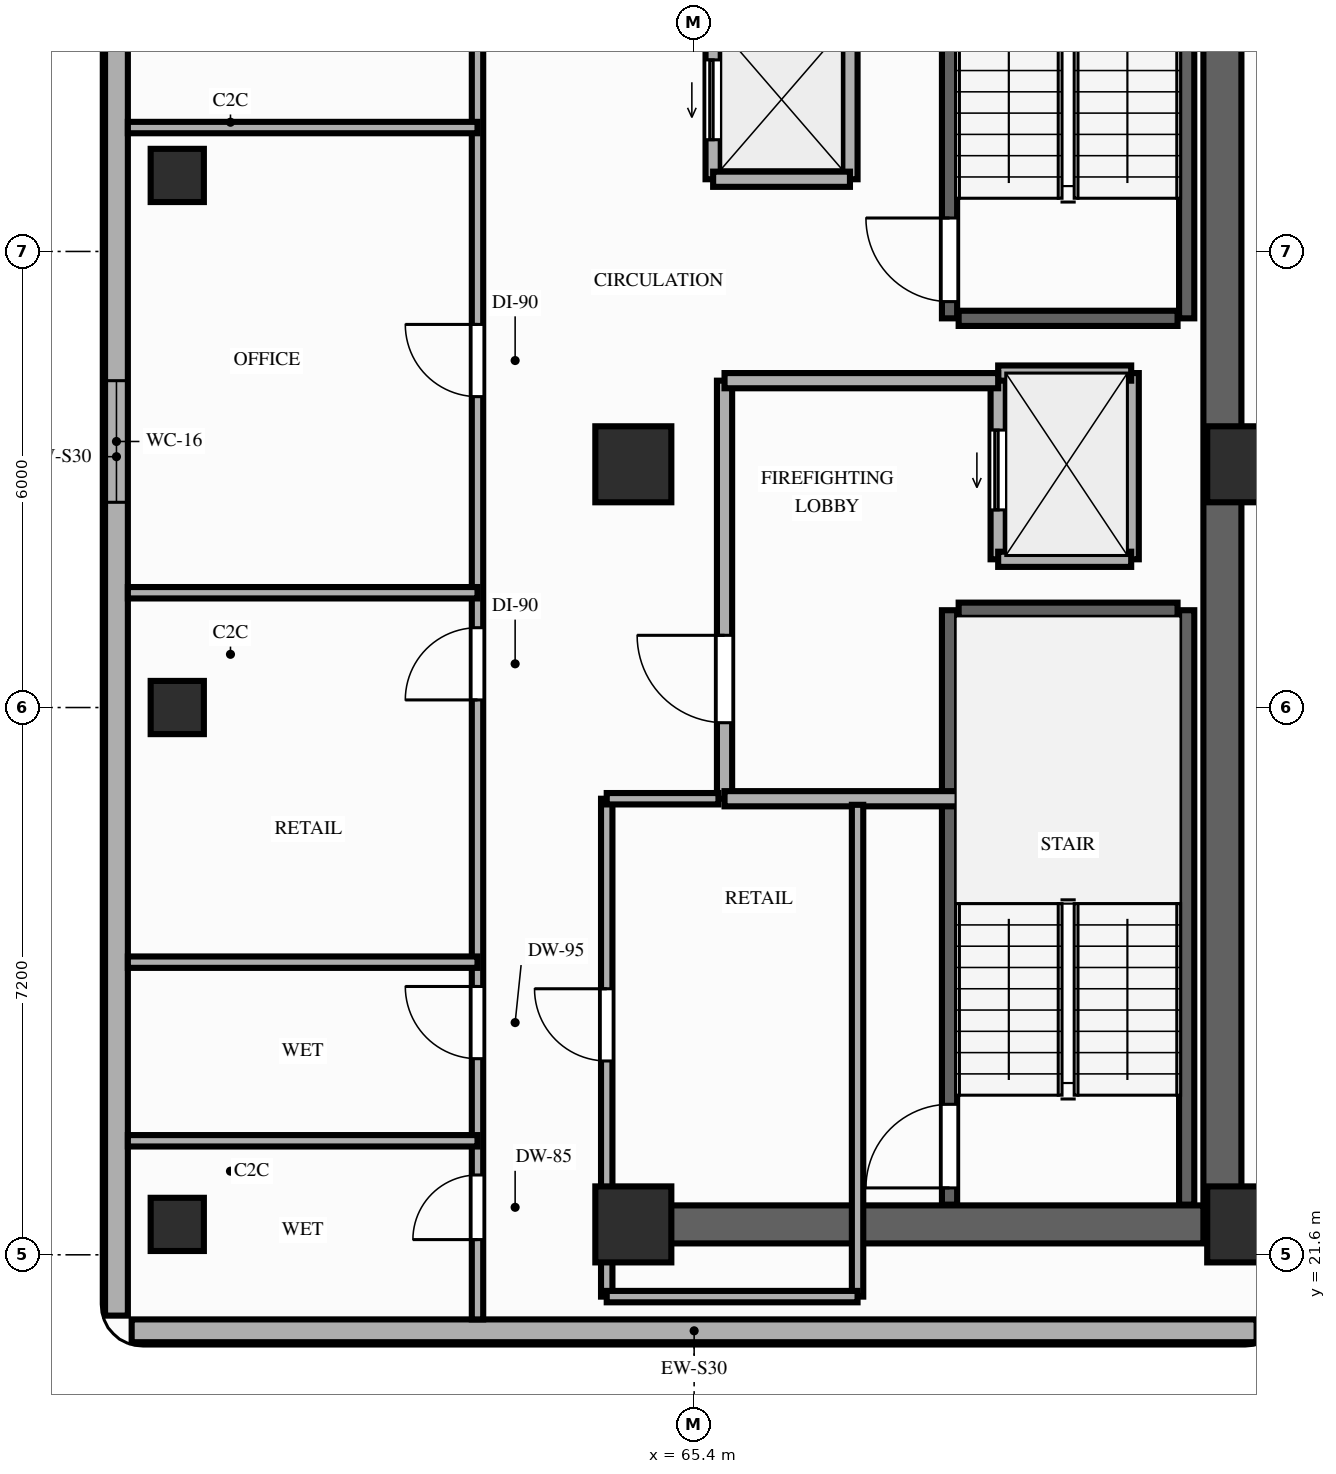
"""IFC4 building model, lengths in metres.
Left out: names, types, materials, properties, quantities, classifications, styles, units other than length and angle.
Written with IfcOpenShell. Run it as: python <this file> out.ifc"""

import sys

from ifc_helpers import new_model, si_unit, direction, frame, frame_2d, origin, origin_2d, place, context, subcontext, project, spatial, rectangle, extrude, element, fill, save


model = new_model("IFC4")
c1 = context("Model", 3, precision=1e-05, world=origin(), true_north=direction((0.0, 1.0)))
c2 = subcontext(c1, "Body", "Model", "MODEL_VIEW")
j1 = project(units=[si_unit("LENGTHUNIT", "METRE"), si_unit("PLANEANGLEUNIT", "RADIAN")], contexts=[c1])
p1 = place(None, origin())
s1 = spatial("IfcSite", under=j1, at=p1, CompositionType="ELEMENT")
p2 = place(p1, origin())
s2 = spatial("IfcBuilding", under=s1, at=p2, CompositionType="ELEMENT")
p3 = place(p2, frame((0.0, 0.0, 96.2)))
s3 = spatial("IfcBuildingStorey", under=s2, at=p3, CompositionType="ELEMENT", Elevation=96.2)
for number, where, z_axis, x_axis in (
    (1, (64.6, 22.0, 0.0), (0.0, 0.0, 1.0), (1.0, 0.0, 0.0)),
    (2, (72.65, 22.0, 0.0), (0.0, 0.0, 1.0), (1.0, 0.0, 0.0)),
    (3, (64.6, 32.0, 0.0), (0.0, 0.0, 1.0), (1.0, 0.0, 0.0)),
    (4, (72.65, 32.0, 0.0), (0.0, 0.0, 1.0), (1.0, 0.0, 0.0)),
):
    element("IfcColumn", number, at=place(p3, frame(where, z_axis=z_axis, x_axis=x_axis)), inside=s3, PredefinedType="COLUMN", context=c2, shape_type="SweptSolid", body=[
        extrude(rectangle(XDim=1.0, YDim=1.0, at=origin_2d()), origin(), (0.0, 0.0, 1.0), 3.2),
    ])
for number, where, z_axis, x_axis in (
    (5, (58.6, 22.0, 0.0), (0.0, 0.0, 1.0), (1.0, 0.0, 0.0)),
    (6, (58.6, 28.8, 0.0), (0.0, 0.0, 1.0), (1.0, 0.0, 0.0)),
    (7, (58.6, 35.8, 0.0), (0.0, 0.0, 1.0), (1.0, 0.0, 0.0)),
):
    element("IfcColumn", number, at=place(p3, frame(where, z_axis=z_axis, x_axis=x_axis)), inside=s3, PredefinedType="COLUMN", context=c2, shape_type="SweptSolid", body=[
        extrude(rectangle(XDim=0.7, YDim=0.7, at=origin_2d()), origin(), (0.0, 0.0, 1.0), 3.2),
    ])
p4 = place(p3, frame((57.8, 43.4, 0.0), z_axis=(0.0, 0.0, 1.0), x_axis=(0.0, -1.0, 0.0)))
e8 = element("IfcWall", 8, at=p4, inside=s3, PredefinedType="STANDARD", context=c2, shape_type="SweptSolid", body=[
    extrude(rectangle(XDim=22.6, YDim=0.3, at=frame_2d((11.3, 0.0))), origin(), (0.0, 0.0, 1.0), 2.72),
])
p5 = place(p4, frame((3.7, 0.0, 0.0)))
e9 = element("IfcOpeningElement", 9, at=p5, cuts=e8, PredefinedType="OPENING", context=c2, shape_type="SweptSolid", body=[
    extrude(rectangle(XDim=1.4, YDim=2.1, at=frame_2d((0.7, 1.05))), frame((0.0, 0.16, 0.0), z_axis=(0.0, -1.0, 0.0), x_axis=(1.0, 0.0, 0.0)), (0.0, 0.0, 1.0), 0.32),
])
p6 = place(p4, frame((10.3, 0.0, 0.85)))
e10 = element("IfcOpeningElement", 10, at=p6, cuts=e8, PredefinedType="OPENING", context=c2, shape_type="SweptSolid", body=[
    extrude(rectangle(XDim=1.6, YDim=1.57, at=frame_2d((0.8, 0.785))), frame((0.0, 0.16, 0.0), z_axis=(0.0, -1.0, 0.0), x_axis=(1.0, 0.0, 0.0)), (0.0, 0.0, 1.0), 0.32),
])
p7 = place(p3, frame((58.0, 20.6, 0.0), z_axis=(0.0, 0.0, 1.0), x_axis=(1.0, 0.0, 0.0)))
e11 = element("IfcWall", 11, at=p7, inside=s3, PredefinedType="STANDARD", context=c2, shape_type="SweptSolid", body=[
    extrude(rectangle(XDim=14.8, YDim=0.3, at=frame_2d((7.4, 0.0))), origin(), (0.0, 0.0, 1.0), 3.02),
])
p8 = place(p3, frame((72.35, 22.0, 0.0), z_axis=(0.0, 0.0, 1.0), x_axis=(0.0, 1.0, 0.0)))
e12 = element("IfcWall", 12, at=p8, inside=s3, PredefinedType="SHEAR", context=c2, shape_type="SweptSolid", body=[
    extrude(rectangle(XDim=20.25, YDim=0.5, at=frame_2d((10.125, 0.0))), origin(), (0.0, 0.0, 1.0), 3.02),
])
p9 = place(p3, frame((64.6, 22.0, 0.0), z_axis=(0.0, 0.0, 1.0), x_axis=(1.0, 0.0, 0.0)))
e13 = element("IfcWall", 13, at=p9, inside=s3, PredefinedType="SHEAR", context=c2, shape_type="SweptSolid", body=[
    extrude(rectangle(XDim=7.5, YDim=0.5, at=frame_2d((3.75, 0.0))), origin(), (0.0, 0.0, 1.0), 3.02),
])
p10 = place(p3, frame((68.76, 22.26, 0.0), z_axis=(0.0, 0.0, 1.0), x_axis=(0.0, 1.0, 0.0)))
e14 = element("IfcWall", 14, at=p10, inside=s3, PredefinedType="SHEAR", context=c2, shape_type="SweptSolid", body=[
    extrude(rectangle(XDim=7.82, YDim=0.2, at=frame_2d((3.91, 0.0))), origin(), (0.0, 0.0, 1.0), 3.02),
])
p11 = place(p10, frame((0.22, 0.0, 0.0)))
e15 = element("IfcOpeningElement", 15, at=p11, cuts=e14, PredefinedType="OPENING", context=c2, shape_type="SweptSolid", body=[
    extrude(rectangle(XDim=1.1, YDim=2.15, at=frame_2d((0.55, 1.075))), frame((0.0, 0.11, 0.0), z_axis=(0.0, -1.0, 0.0), x_axis=(1.0, 0.0, 0.0)), (0.0, 0.0, 1.0), 0.22),
])
p12 = place(p3, frame((71.88, 22.26, 0.0), z_axis=(0.0, 0.0, 1.0), x_axis=(0.0, 1.0, 0.0)))
e16 = element("IfcWall", 16, at=p12, inside=s3, PredefinedType="SHEAR", context=c2, shape_type="SweptSolid", body=[
    extrude(rectangle(XDim=7.82, YDim=0.2, at=frame_2d((3.91, 0.0))), origin(), (0.0, 0.0, 1.0), 3.02),
])
p13 = place(p3, frame((68.88, 30.08, 0.0), z_axis=(0.0, 0.0, 1.0), x_axis=(1.0, 0.0, 0.0)))
e17 = element("IfcWall", 17, at=p13, inside=s3, PredefinedType="SHEAR", context=c2, shape_type="SweptSolid", body=[
    extrude(rectangle(XDim=2.88, YDim=0.2, at=frame_2d((1.44, 0.0))), origin(), (0.0, 0.0, 1.0), 3.02),
])
p14 = place(p3, frame((68.76, 33.92, 0.0), z_axis=(0.0, 0.0, 1.0), x_axis=(0.0, 1.0, 0.0)))
e18 = element("IfcWall", 18, at=p14, inside=s3, PredefinedType="SHEAR", context=c2, shape_type="SweptSolid", body=[
    extrude(rectangle(XDim=7.96, YDim=0.2, at=frame_2d((3.98, 0.0))), origin(), (0.0, 0.0, 1.0), 3.02),
])
p15 = place(p14, frame((0.22, 0.0, 0.0)))
e19 = element("IfcOpeningElement", 19, at=p15, cuts=e18, PredefinedType="OPENING", context=c2, shape_type="SweptSolid", body=[
    extrude(rectangle(XDim=1.1, YDim=2.15, at=frame_2d((0.55, 1.075))), frame((0.0, 0.11, 0.0), z_axis=(0.0, -1.0, 0.0), x_axis=(1.0, 0.0, 0.0)), (0.0, 0.0, 1.0), 0.22),
])
p16 = place(p3, frame((71.88, 33.92, 0.0), z_axis=(0.0, 0.0, 1.0), x_axis=(0.0, 1.0, 0.0)))
e20 = element("IfcWall", 20, at=p16, inside=s3, PredefinedType="SHEAR", context=c2, shape_type="SweptSolid", body=[
    extrude(rectangle(XDim=7.96, YDim=0.2, at=frame_2d((3.98, 0.0))), origin(), (0.0, 0.0, 1.0), 3.02),
])
p17 = place(p3, frame((68.88, 33.92, 0.0), z_axis=(0.0, 0.0, 1.0), x_axis=(1.0, 0.0, 0.0)))
e21 = element("IfcWall", 21, at=p17, inside=s3, PredefinedType="SHEAR", context=c2, shape_type="SweptSolid", body=[
    extrude(rectangle(XDim=2.88, YDim=0.2, at=frame_2d((1.44, 0.0))), origin(), (0.0, 0.0, 1.0), 3.02),
])
p18 = place(p3, frame((65.65, 35.75, 0.0), z_axis=(0.0, 0.0, 1.0), x_axis=(0.0, 1.0, 0.0)))
e22 = element("IfcWall", 22, at=p18, inside=s3, PredefinedType="MOVABLE", context=c2, shape_type="SweptSolid", body=[
    extrude(rectangle(XDim=6.05, YDim=0.2, at=frame_2d((3.025, 0.0))), origin(), (0.0, 0.0, 1.0), 3.02),
])
p19 = place(p18, frame((0.52, 0.0, 0.0)))
e23 = element("IfcOpeningElement", 23, at=p19, cuts=e22, PredefinedType="OPENING", context=c2, shape_type="SweptSolid", body=[
    extrude(rectangle(XDim=1.05, YDim=2.15, at=frame_2d((0.525, 1.075))), frame((0.0, 0.11, 0.0), z_axis=(0.0, -1.0, 0.0), x_axis=(1.0, 0.0, 0.0)), (0.0, 0.0, 1.0), 0.22),
])
p20 = place(p18, frame((2.48, 0.0, 0.0)))
e24 = element("IfcOpeningElement", 24, at=p20, cuts=e22, PredefinedType="OPENING", context=c2, shape_type="SweptSolid", body=[
    extrude(rectangle(XDim=1.05, YDim=2.15, at=frame_2d((0.525, 1.075))), frame((0.0, 0.11, 0.0), z_axis=(0.0, -1.0, 0.0), x_axis=(1.0, 0.0, 0.0)), (0.0, 0.0, 1.0), 0.22),
])
p21 = place(p18, frame((4.43, 0.0, 0.0)))
e25 = element("IfcOpeningElement", 25, at=p21, cuts=e22, PredefinedType="OPENING", context=c2, shape_type="SweptSolid", body=[
    extrude(rectangle(XDim=1.05, YDim=2.15, at=frame_2d((0.525, 1.075))), frame((0.0, 0.11, 0.0), z_axis=(0.0, -1.0, 0.0), x_axis=(1.0, 0.0, 0.0)), (0.0, 0.0, 1.0), 0.22),
])
p22 = place(p3, frame((67.45, 35.75, 0.0), z_axis=(0.0, 0.0, 1.0), x_axis=(0.0, 1.0, 0.0)))
e26 = element("IfcWall", 26, at=p22, inside=s3, PredefinedType="MOVABLE", context=c2, shape_type="SweptSolid", body=[
    extrude(rectangle(XDim=6.05, YDim=0.2, at=frame_2d((3.025, 0.0))), origin(), (0.0, 0.0, 1.0), 3.02),
])
p23 = place(p3, frame((65.65, 35.75, 0.0), z_axis=(0.0, 0.0, 1.0), x_axis=(1.0, 0.0, 0.0)))
e27 = element("IfcWall", 27, at=p23, inside=s3, PredefinedType="MOVABLE", context=c2, shape_type="SweptSolid", body=[
    extrude(rectangle(XDim=1.8, YDim=0.2, at=frame_2d((0.9, 0.0))), origin(), (0.0, 0.0, 1.0), 3.02),
])
p24 = place(p3, frame((69.4, 30.75, 0.0), z_axis=(0.0, 0.0, 1.0), x_axis=(0.0, 1.0, 0.0)))
e28 = element("IfcWall", 28, at=p24, inside=s3, PredefinedType="MOVABLE", context=c2, shape_type="SweptSolid", body=[
    extrude(rectangle(XDim=2.45, YDim=0.2, at=frame_2d((1.225, 0.0))), origin(), (0.0, 0.0, 1.0), 3.02),
])
p25 = place(p24, frame((0.65, 0.0, 0.0)))
e29 = element("IfcOpeningElement", 29, at=p25, cuts=e28, PredefinedType="OPENING", context=c2, shape_type="SweptSolid", body=[
    extrude(rectangle(XDim=1.05, YDim=2.15, at=frame_2d((0.525, 1.075))), frame((0.0, 0.11, 0.0), z_axis=(0.0, -1.0, 0.0), x_axis=(1.0, 0.0, 0.0)), (0.0, 0.0, 1.0), 0.22),
])
p26 = place(p3, frame((71.15, 30.75, 0.0), z_axis=(0.0, 0.0, 1.0), x_axis=(0.0, 1.0, 0.0)))
e30 = element("IfcWall", 30, at=p26, inside=s3, PredefinedType="MOVABLE", context=c2, shape_type="SweptSolid", body=[
    extrude(rectangle(XDim=2.45, YDim=0.2, at=frame_2d((1.225, 0.0))), origin(), (0.0, 0.0, 1.0), 3.02),
])
for number, where, z_axis, x_axis in (
    (31, (69.4, 33.2, 0.0), (0.0, 0.0, 1.0), (1.0, 0.0, 0.0)),
    (32, (69.4, 30.75, 0.0), (0.0, 0.0, 1.0), (1.0, 0.0, 0.0)),
):
    element("IfcWall", number, at=place(p3, frame(where, z_axis=z_axis, x_axis=x_axis)), inside=s3, PredefinedType="MOVABLE", context=c2, shape_type="SweptSolid", body=[
        extrude(rectangle(XDim=1.75, YDim=0.2, at=frame_2d((0.875, 0.0))), origin(), (0.0, 0.0, 1.0), 3.02),
    ])
p27 = place(p3, frame((65.8, 27.6, 0.0), z_axis=(0.0, 0.0, 1.0), x_axis=(0.0, 1.0, 0.0)))
e33 = element("IfcWall", 33, at=p27, inside=s3, PredefinedType="PARTITIONING", context=c2, shape_type="SweptSolid", body=[
    extrude(rectangle(XDim=5.5, YDim=0.2, at=frame_2d((2.75, 0.0))), origin(), (0.0, 0.0, 1.0), 3.02),
])
p28 = place(p27, frame((1.0, 0.0, 0.0)))
e34 = element("IfcOpeningElement", 34, at=p28, cuts=e33, PredefinedType="OPENING", context=c2, shape_type="SweptSolid", body=[
    extrude(rectangle(XDim=1.15, YDim=2.15, at=frame_2d((0.575, 1.075))), frame((0.0, 0.11, 0.0), z_axis=(0.0, -1.0, 0.0), x_axis=(1.0, 0.0, 0.0)), (0.0, 0.0, 1.0), 0.22),
])
p29 = place(p3, frame((65.8, 33.1, 0.0), z_axis=(0.0, 0.0, 1.0), x_axis=(1.0, 0.0, 0.0)))
e35 = element("IfcWall", 35, at=p29, inside=s3, PredefinedType="PARTITIONING", context=c2, shape_type="SweptSolid", body=[
    extrude(rectangle(XDim=3.6, YDim=0.2, at=frame_2d((1.8, 0.0))), origin(), (0.0, 0.0, 1.0), 3.02),
])
p30 = place(p3, frame((65.8, 27.6, 0.0), z_axis=(0.0, 0.0, 1.0), x_axis=(1.0, 0.0, 0.0)))
e36 = element("IfcWall", 36, at=p30, inside=s3, PredefinedType="PARTITIONING", context=c2, shape_type="SweptSolid", body=[
    extrude(rectangle(XDim=3.4, YDim=0.2, at=frame_2d((1.7, 0.0))), origin(), (0.0, 0.0, 1.0), 3.02),
])
p31 = place(p3, frame((64.25, 21.05, 0.0), z_axis=(0.0, 0.0, 1.0), x_axis=(0.0, 1.0, 0.0)))
e37 = element("IfcWall", 37, at=p31, inside=s3, PredefinedType="PARTITIONING", context=c2, shape_type="SweptSolid", body=[
    extrude(rectangle(XDim=6.55, YDim=0.15, at=frame_2d((3.275, 0.0))), origin(), (0.0, 0.0, 1.0), 2.6),
])
p32 = place(p31, frame((3.1, 0.0, 0.0)))
e38 = element("IfcOpeningElement", 38, at=p32, cuts=e37, PredefinedType="OPENING", context=c2, shape_type="SweptSolid", body=[
    extrude(rectangle(XDim=0.95, YDim=2.15, at=frame_2d((0.475, 1.075))), frame((0.0, 0.085, 0.0), z_axis=(0.0, -1.0, 0.0), x_axis=(1.0, 0.0, 0.0)), (0.0, 0.0, 1.0), 0.17),
])
p33 = place(p3, frame((67.55, 21.05, 0.0), z_axis=(0.0, 0.0, 1.0), x_axis=(0.0, 1.0, 0.0)))
e39 = element("IfcWall", 39, at=p33, inside=s3, PredefinedType="PARTITIONING", context=c2, shape_type="SweptSolid", body=[
    extrude(rectangle(XDim=6.47, YDim=0.15, at=frame_2d((3.235, 0.0))), origin(), (0.0, 0.0, 1.0), 2.6),
])
p34 = place(p3, frame((64.25, 21.05, 0.0), z_axis=(0.0, 0.0, 1.0), x_axis=(1.0, 0.0, 0.0)))
e40 = element("IfcWall", 40, at=p34, inside=s3, PredefinedType="PARTITIONING", context=c2, shape_type="SweptSolid", body=[
    extrude(rectangle(XDim=3.3, YDim=0.15, at=frame_2d((1.65, 0.0))), origin(), (0.0, 0.0, 1.0), 3.02),
])
p35 = place(p3, frame((64.25, 27.6, 0.0), z_axis=(0.0, 0.0, 1.0), x_axis=(1.0, 0.0, 0.0)))
e41 = element("IfcWall", 41, at=p35, inside=s3, PredefinedType="PARTITIONING", context=c2, shape_type="SweptSolid", body=[
    extrude(rectangle(XDim=1.47, YDim=0.15, at=frame_2d((0.735, 0.0))), origin(), (0.0, 0.0, 1.0), 2.6),
])
p36 = place(p3, frame((62.55, 20.75, 0.0), z_axis=(0.0, 0.0, 1.0), x_axis=(0.0, 1.0, 0.0)))
e42 = element("IfcWall", 42, at=p36, inside=s3, PredefinedType="PARTITIONING", context=c2, shape_type="SweptSolid", body=[
    extrude(rectangle(XDim=22.7, YDim=0.15, at=frame_2d((11.35, 0.0))), origin(), (0.0, 0.0, 1.0), 2.6),
])
p37 = place(p36, frame((1.05, 0.0, 0.0)))
e43 = element("IfcOpeningElement", 43, at=p37, cuts=e42, PredefinedType="OPENING", context=c2, shape_type="SweptSolid", body=[
    extrude(rectangle(XDim=0.85, YDim=2.1, at=frame_2d((0.425, 1.05))), frame((0.0, 0.085, 0.0), z_axis=(0.0, -1.0, 0.0), x_axis=(1.0, 0.0, 0.0)), (0.0, 0.0, 1.0), 0.17),
])
p38 = place(p36, frame((3.43, 0.0, 0.0)))
e44 = element("IfcOpeningElement", 44, at=p38, cuts=e42, PredefinedType="OPENING", context=c2, shape_type="SweptSolid", body=[
    extrude(rectangle(XDim=0.95, YDim=2.1, at=frame_2d((0.475, 1.05))), frame((0.0, 0.085, 0.0), z_axis=(0.0, -1.0, 0.0), x_axis=(1.0, 0.0, 0.0)), (0.0, 0.0, 1.0), 0.17),
])
p39 = place(p36, frame((8.15, 0.0, 0.0)))
e45 = element("IfcOpeningElement", 45, at=p39, cuts=e42, PredefinedType="OPENING", context=c2, shape_type="SweptSolid", body=[
    extrude(rectangle(XDim=0.95, YDim=2.15, at=frame_2d((0.475, 1.075))), frame((0.0, 0.085, 0.0), z_axis=(0.0, -1.0, 0.0), x_axis=(1.0, 0.0, 0.0)), (0.0, 0.0, 1.0), 0.17),
])
p40 = place(p36, frame((12.14, 0.0, 0.0)))
e46 = element("IfcOpeningElement", 46, at=p40, cuts=e42, PredefinedType="OPENING", context=c2, shape_type="SweptSolid", body=[
    extrude(rectangle(XDim=0.95, YDim=2.15, at=frame_2d((0.475, 1.075))), frame((0.0, 0.085, 0.0), z_axis=(0.0, -1.0, 0.0), x_axis=(1.0, 0.0, 0.0)), (0.0, 0.0, 1.0), 0.17),
])
p41 = place(p36, frame((18.71, 0.0, 0.0)))
e47 = element("IfcOpeningElement", 47, at=p41, cuts=e42, PredefinedType="OPENING", context=c2, shape_type="SweptSolid", body=[
    extrude(rectangle(XDim=0.95, YDim=2.15, at=frame_2d((0.475, 1.075))), frame((0.0, 0.085, 0.0), z_axis=(0.0, -1.0, 0.0), x_axis=(1.0, 0.0, 0.0)), (0.0, 0.0, 1.0), 0.17),
])
for number, where, z_axis, x_axis in (
    (48, (57.95, 23.1, 0.0), (0.0, 0.0, 1.0), (1.0, 0.0, 0.0)),
    (49, (57.95, 25.45, 0.0), (0.0, 0.0, 1.0), (1.0, 0.0, 0.0)),
    (50, (57.95, 30.31, 0.0), (0.0, 0.0, 1.0), (1.0, 0.0, 0.0)),
    (51, (57.95, 36.43, 0.0), (0.0, 0.0, 1.0), (1.0, 0.0, 0.0)),
):
    element("IfcWall", number, at=place(p3, frame(where, z_axis=z_axis, x_axis=x_axis)), inside=s3, PredefinedType="PARTITIONING", context=c2, shape_type="SweptSolid", body=[
        extrude(rectangle(XDim=4.6, YDim=0.15, at=frame_2d((2.3, 0.0))), origin(), (0.0, 0.0, 1.0), 2.6),
    ])
p42 = place(p6, origin())
e52 = element("IfcWindow", 52, at=p42, inside=s3, PartitioningType="SINGLE_PANEL", PredefinedType="WINDOW", context=c2, shape_type="SweptSolid", body=[
    extrude(rectangle(XDim=1.6, YDim=1.57, at=frame_2d((0.8, 0.785))), frame((0.0, 0.03, 0.0), z_axis=(0.0, -1.0, 0.0), x_axis=(1.0, 0.0, 0.0)), (0.0, 0.0, 1.0), 0.06),
])
fill(e10, e52)
p43 = place(p11, origin())
e53 = element("IfcDoor", 53, at=p43, inside=s3, OperationType="SINGLE_SWING_LEFT", PredefinedType="DOOR", context=c2, shape_type="SweptSolid", body=[
    extrude(rectangle(XDim=1.1, YDim=2.15, at=frame_2d((0.55, 1.075))), frame((0.0, 0.025, 0.0), z_axis=(0.0, -1.0, 0.0), x_axis=(1.0, 0.0, 0.0)), (0.0, 0.0, 1.0), 0.05),
])
fill(e15, e53)
p44 = place(p15, origin())
e54 = element("IfcDoor", 54, at=p44, inside=s3, OperationType="SINGLE_SWING_RIGHT", PredefinedType="DOOR", context=c2, shape_type="SweptSolid", body=[
    extrude(rectangle(XDim=1.1, YDim=2.15, at=frame_2d((0.55, 1.075))), frame((0.0, 0.025, 0.0), z_axis=(0.0, -1.0, 0.0), x_axis=(1.0, 0.0, 0.0)), (0.0, 0.0, 1.0), 0.05),
])
fill(e19, e54)
p45 = place(p19, origin())
e55 = element("IfcDoor", 55, at=p45, inside=s3, OperationType="SLIDING_TO_LEFT", PredefinedType="DOOR", context=c2, shape_type="SweptSolid", body=[
    extrude(rectangle(XDim=1.05, YDim=2.15, at=frame_2d((0.525, 1.075))), frame((0.0, 0.025, 0.0), z_axis=(0.0, -1.0, 0.0), x_axis=(1.0, 0.0, 0.0)), (0.0, 0.0, 1.0), 0.05),
])
fill(e23, e55)
p46 = place(p25, origin())
e56 = element("IfcDoor", 56, at=p46, inside=s3, OperationType="SLIDING_TO_LEFT", PredefinedType="DOOR", context=c2, shape_type="SweptSolid", body=[
    extrude(rectangle(XDim=1.05, YDim=2.15, at=frame_2d((0.525, 1.075))), frame((0.0, 0.025, 0.0), z_axis=(0.0, -1.0, 0.0), x_axis=(1.0, 0.0, 0.0)), (0.0, 0.0, 1.0), 0.05),
])
fill(e29, e56)
p47 = place(p28, origin())
e57 = element("IfcDoor", 57, at=p47, inside=s3, OperationType="SINGLE_SWING_RIGHT", PredefinedType="DOOR", context=c2, shape_type="SweptSolid", body=[
    extrude(rectangle(XDim=1.15, YDim=2.15, at=frame_2d((0.575, 1.075))), frame((0.0, 0.025, 0.0), z_axis=(0.0, -1.0, 0.0), x_axis=(1.0, 0.0, 0.0)), (0.0, 0.0, 1.0), 0.05),
])
fill(e34, e57)
p48 = place(p32, origin())
e58 = element("IfcDoor", 58, at=p48, inside=s3, OperationType="SINGLE_SWING_RIGHT", PredefinedType="DOOR", context=c2, shape_type="SweptSolid", body=[
    extrude(rectangle(XDim=0.95, YDim=2.15, at=frame_2d((0.475, 1.075))), frame((0.0, 0.025, 0.0), z_axis=(0.0, -1.0, 0.0), x_axis=(1.0, 0.0, 0.0)), (0.0, 0.0, 1.0), 0.05),
])
fill(e38, e58)
p49 = place(p37, origin())
e59 = element("IfcDoor", 59, at=p49, inside=s3, OperationType="SINGLE_SWING_LEFT", PredefinedType="DOOR", context=c2, shape_type="SweptSolid", body=[
    extrude(rectangle(XDim=0.85, YDim=2.1, at=frame_2d((0.425, 1.05))), frame((0.0, 0.025, 0.0), z_axis=(0.0, -1.0, 0.0), x_axis=(1.0, 0.0, 0.0)), (0.0, 0.0, 1.0), 0.05),
])
fill(e43, e59)
p50 = place(p38, origin())
e60 = element("IfcDoor", 60, at=p50, inside=s3, OperationType="SINGLE_SWING_RIGHT", PredefinedType="DOOR", context=c2, shape_type="SweptSolid", body=[
    extrude(rectangle(XDim=0.95, YDim=2.1, at=frame_2d((0.475, 1.05))), frame((0.0, 0.025, 0.0), z_axis=(0.0, -1.0, 0.0), x_axis=(1.0, 0.0, 0.0)), (0.0, 0.0, 1.0), 0.05),
])
fill(e44, e60)
p51 = place(p39, origin())
e61 = element("IfcDoor", 61, at=p51, inside=s3, OperationType="SINGLE_SWING_LEFT", PredefinedType="DOOR", context=c2, shape_type="SweptSolid", body=[
    extrude(rectangle(XDim=0.95, YDim=2.15, at=frame_2d((0.475, 1.075))), frame((0.0, 0.025, 0.0), z_axis=(0.0, -1.0, 0.0), x_axis=(1.0, 0.0, 0.0)), (0.0, 0.0, 1.0), 0.05),
])
fill(e45, e61)
p52 = place(p40, origin())
e62 = element("IfcDoor", 62, at=p52, inside=s3, OperationType="SINGLE_SWING_RIGHT", PredefinedType="DOOR", context=c2, shape_type="SweptSolid", body=[
    extrude(rectangle(XDim=0.95, YDim=2.15, at=frame_2d((0.475, 1.075))), frame((0.0, 0.025, 0.0), z_axis=(0.0, -1.0, 0.0), x_axis=(1.0, 0.0, 0.0)), (0.0, 0.0, 1.0), 0.05),
])
fill(e46, e62)
save(model, sys.argv[1])
